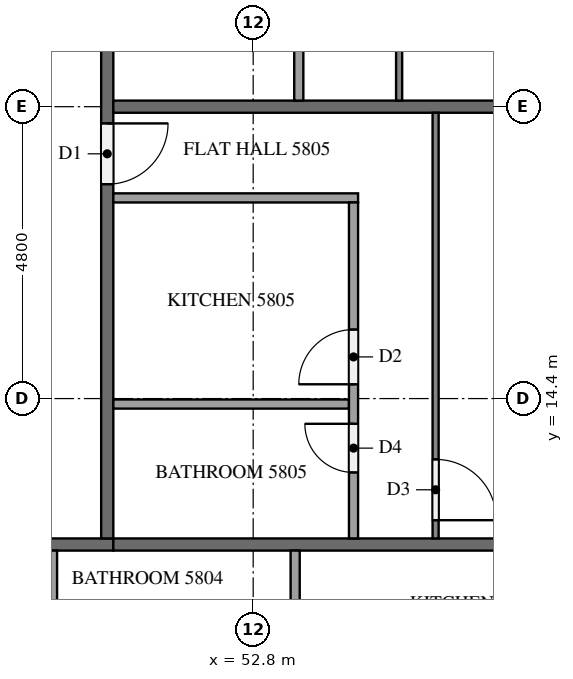
"""IFC4 building model, lengths in metres.
Left out: names, types, materials, properties, quantities, classifications, styles, units other than length and angle.
Written with IfcOpenShell. Run it as: python <this file> out.ifc"""

import sys

from ifc_helpers import new_model, si_unit, direction, frame, frame_2d, origin, place, context, subcontext, project, spatial, rectangle, extrude, element, fill, save


model = new_model("IFC4")
c1 = context("Model", 3, precision=1e-05, world=origin(), true_north=direction((0.0, 1.0)))
c2 = subcontext(c1, "Body", "Model", "MODEL_VIEW")
j1 = project(units=[si_unit("LENGTHUNIT", "METRE"), si_unit("PLANEANGLEUNIT", "RADIAN")], contexts=[c1])
p1 = place(None, origin())
s1 = spatial("IfcSite", under=j1, at=p1, CompositionType="ELEMENT")
p2 = place(p1, origin())
s2 = spatial("IfcBuilding", under=s1, at=p2, CompositionType="ELEMENT")
p3 = place(p2, frame((0.0, 0.0, 222.8)))
s3 = spatial("IfcBuildingStorey", under=s2, at=p3, CompositionType="ELEMENT", Elevation=222.8)
p4 = place(p3, frame((50.5, 12.0, 0.0), z_axis=(0.0, 0.0, 1.0), x_axis=(-1.0, 0.0, 0.0)))
e1 = element("IfcWall", 1, at=p4, inside=s3, PredefinedType="PARTITIONING", context=c2, shape_type="SweptSolid", body=[
    extrude(rectangle(XDim=38.6, YDim=0.2, at=frame_2d((19.3, 0.0))), origin(), (0.0, 0.0, 1.0), 3.2),
])
p5 = place(p4, frame((36.375, 0.0, 0.0)))
e2 = element("IfcOpeningElement", 2, at=p5, cuts=e1, PredefinedType="OPENING", context=c2, shape_type="SweptSolid", body=[
    extrude(rectangle(XDim=1.0, YDim=2.1, at=frame_2d((0.5, 1.05))), frame((0.0, 0.11, 0.0), z_axis=(0.0, -1.0, 0.0), x_axis=(1.0, 0.0, 0.0)), (0.0, 0.0, 1.0), 0.22),
])
p6 = place(p4, frame((34.825, 0.0, 0.0)))
e3 = element("IfcOpeningElement", 3, at=p6, cuts=e1, PredefinedType="OPENING", context=c2, shape_type="SweptSolid", body=[
    extrude(rectangle(XDim=1.0, YDim=2.1, at=frame_2d((0.5, 1.05))), frame((0.0, 0.11, 0.0), z_axis=(0.0, -1.0, 0.0), x_axis=(1.0, 0.0, 0.0)), (0.0, 0.0, 1.0), 0.22),
])
p7 = place(p4, frame((20.375, 0.0, 0.0)))
e4 = element("IfcOpeningElement", 4, at=p7, cuts=e1, PredefinedType="OPENING", context=c2, shape_type="SweptSolid", body=[
    extrude(rectangle(XDim=1.1, YDim=2.1, at=frame_2d((0.55, 1.05))), frame((0.0, 0.11, 0.0), z_axis=(0.0, -1.0, 0.0), x_axis=(1.0, 0.0, 0.0)), (0.0, 0.0, 1.0), 0.22),
])
p8 = place(p4, frame((1.225, 0.0, 0.0)))
e5 = element("IfcOpeningElement", 5, at=p8, cuts=e1, PredefinedType="OPENING", context=c2, shape_type="SweptSolid", body=[
    extrude(rectangle(XDim=1.0, YDim=2.1, at=frame_2d((0.5, 1.05))), frame((0.0, 0.11, 0.0), z_axis=(0.0, -1.0, 0.0), x_axis=(1.0, 0.0, 0.0)), (0.0, 0.0, 1.0), 0.22),
])
p9 = place(p3, frame((50.4, 40.7, 0.0), z_axis=(0.0, 0.0, 1.0), x_axis=(0.0, -1.0, 0.0)))
e6 = element("IfcWall", 6, at=p9, inside=s3, PredefinedType="PARTITIONING", context=c2, shape_type="SweptSolid", body=[
    extrude(rectangle(XDim=28.6, YDim=0.2, at=frame_2d((14.3, 0.0))), origin(), (0.0, 0.0, 1.0), 3.2),
])
p10 = place(p9, frame((21.775, 0.0, 0.0)))
e7 = element("IfcOpeningElement", 7, at=p10, cuts=e6, PredefinedType="OPENING", context=c2, shape_type="SweptSolid", body=[
    extrude(rectangle(XDim=1.0, YDim=2.1, at=frame_2d((0.5, 1.05))), frame((0.0, 0.11, 0.0), z_axis=(0.0, -1.0, 0.0), x_axis=(1.0, 0.0, 0.0)), (0.0, 0.0, 1.0), 0.22),
])
p11 = place(p9, frame((7.375, 0.0, 0.0)))
e8 = element("IfcOpeningElement", 8, at=p11, cuts=e6, PredefinedType="OPENING", context=c2, shape_type="SweptSolid", body=[
    extrude(rectangle(XDim=1.0, YDim=2.1, at=frame_2d((0.5, 1.05))), frame((0.0, 0.11, 0.0), z_axis=(0.0, -1.0, 0.0), x_axis=(1.0, 0.0, 0.0)), (0.0, 0.0, 1.0), 0.22),
])
p12 = place(p9, frame((0.175, 0.0, 0.0)))
e9 = element("IfcOpeningElement", 9, at=p12, cuts=e6, PredefinedType="OPENING", context=c2, shape_type="SweptSolid", body=[
    extrude(rectangle(XDim=1.0, YDim=2.1, at=frame_2d((0.5, 1.05))), frame((0.0, 0.11, 0.0), z_axis=(0.0, -1.0, 0.0), x_axis=(1.0, 0.0, 0.0)), (0.0, 0.0, 1.0), 0.22),
])
p13 = place(p3, frame((50.5, 12.0, 0.0), z_axis=(0.0, 0.0, 1.0), x_axis=(1.0, 0.0, 0.0)))
e10 = element("IfcWall", 10, at=p13, inside=s3, PredefinedType="PARTITIONING", context=c2, shape_type="SweptSolid", body=[
    extrude(rectangle(XDim=11.8, YDim=0.2, at=frame_2d((5.9, 0.0))), origin(), (0.0, 0.0, 1.0), 3.2),
])
p14 = place(p3, frame((50.5, 19.2, 0.0), z_axis=(0.0, 0.0, 1.0), x_axis=(1.0, 0.0, 0.0)))
e11 = element("IfcWall", 11, at=p14, inside=s3, PredefinedType="PARTITIONING", context=c2, shape_type="SweptSolid", body=[
    extrude(rectangle(XDim=11.575, YDim=0.2, at=frame_2d((5.788, 0.0))), origin(), (0.0, 0.0, 1.0), 3.2),
])
p15 = place(p3, frame((53.49, 11.9, 0.0), z_axis=(0.0, 0.0, 1.0), x_axis=(0.0, -1.0, 0.0)))
e12 = element("IfcWall", 12, at=p15, inside=s3, PredefinedType="PARTITIONING", context=c2, shape_type="SweptSolid", body=[
    extrude(rectangle(XDim=1.775, YDim=0.15, at=frame_2d((0.887, 0.0))), origin(), (0.0, 0.0, 1.0), 3.2),
])
p16 = place(p3, frame((49.5, 11.9, 0.0), z_axis=(0.0, 0.0, 1.0), x_axis=(0.0, -1.0, 0.0)))
e13 = element("IfcWall", 13, at=p16, inside=s3, PredefinedType="PARTITIONING", context=c2, shape_type="SweptSolid", body=[
    extrude(rectangle(XDim=1.925, YDim=0.15, at=frame_2d((0.962, 0.0))), origin(), (0.0, 0.0, 1.0), 3.2),
])
p17 = place(p3, frame((55.8, 19.1, 0.0), z_axis=(0.0, 0.0, 1.0), x_axis=(0.0, -1.0, 0.0)))
e14 = element("IfcWall", 14, at=p17, inside=s3, PredefinedType="PARTITIONING", context=c2, shape_type="SweptSolid", body=[
    extrude(rectangle(XDim=7.0, YDim=0.1, at=frame_2d((3.5, 0.0))), origin(), (0.0, 0.0, 1.0), 3.2),
])
p18 = place(p17, frame((5.7, 0.0, 0.0)))
e15 = element("IfcOpeningElement", 15, at=p18, cuts=e14, PredefinedType="OPENING", context=c2, shape_type="SweptSolid", body=[
    extrude(rectangle(XDim=1.0, YDim=2.1, at=frame_2d((0.5, 1.05))), frame((0.0, 0.06, 0.0), z_axis=(0.0, -1.0, 0.0), x_axis=(1.0, 0.0, 0.0)), (0.0, 0.0, 1.0), 0.12),
])
p19 = place(p3, frame((50.5, 14.31, 0.0), z_axis=(0.0, 0.0, 1.0), x_axis=(1.0, 0.0, 0.0)))
e16 = element("IfcWall", 16, at=p19, inside=s3, PredefinedType="PARTITIONING", context=c2, shape_type="SweptSolid", body=[
    extrude(rectangle(XDim=3.875, YDim=0.15, at=frame_2d((1.938, 0.0))), origin(), (0.0, 0.0, 1.0), 3.2),
])
p20 = place(p3, frame((50.5, 17.7, 0.0), z_axis=(0.0, 0.0, 1.0), x_axis=(1.0, 0.0, 0.0)))
e17 = element("IfcWall", 17, at=p20, inside=s3, PredefinedType="PARTITIONING", context=c2, shape_type="SweptSolid", body=[
    extrude(rectangle(XDim=4.025, YDim=0.15, at=frame_2d((2.012, 0.0))), origin(), (0.0, 0.0, 1.0), 3.2),
])
p21 = place(p3, frame((54.45, 12.1, 0.0), z_axis=(0.0, 0.0, 1.0), x_axis=(0.0, 1.0, 0.0)))
e18 = element("IfcWall", 18, at=p21, inside=s3, PredefinedType="PARTITIONING", context=c2, shape_type="SweptSolid", body=[
    extrude(rectangle(XDim=5.525, YDim=0.15, at=frame_2d((2.762, 0.0))), origin(), (0.0, 0.0, 1.0), 3.2),
])
p22 = place(p21, frame((2.535, 0.0, 0.0)))
e19 = element("IfcOpeningElement", 19, at=p22, cuts=e18, PredefinedType="OPENING", context=c2, shape_type="SweptSolid", body=[
    extrude(rectangle(XDim=0.9, YDim=2.1, at=frame_2d((0.45, 1.05))), frame((0.0, 0.085, 0.0), z_axis=(0.0, -1.0, 0.0), x_axis=(1.0, 0.0, 0.0)), (0.0, 0.0, 1.0), 0.17),
])
p23 = place(p21, frame((1.085, 0.0, 0.0)))
e20 = element("IfcOpeningElement", 20, at=p23, cuts=e18, PredefinedType="OPENING", context=c2, shape_type="SweptSolid", body=[
    extrude(rectangle(XDim=0.8, YDim=2.1, at=frame_2d((0.4, 1.05))), frame((0.0, 0.085, 0.0), z_axis=(0.0, -1.0, 0.0), x_axis=(1.0, 0.0, 0.0)), (0.0, 0.0, 1.0), 0.17),
])
p24 = place(p3, frame((55.2, 33.5, 0.0), z_axis=(0.0, 0.0, 1.0), x_axis=(0.0, -1.0, 0.0)))
e21 = element("IfcWall", 21, at=p24, inside=s3, PredefinedType="PARTITIONING", context=c2, shape_type="SweptSolid", body=[
    extrude(rectangle(XDim=14.2, YDim=0.1, at=frame_2d((7.1, 0.0))), origin(), (0.0, 0.0, 1.0), 3.2),
])
p25 = place(p24, frame((0.3, 0.0, 0.0)))
e22 = element("IfcOpeningElement", 22, at=p25, cuts=e21, PredefinedType="OPENING", context=c2, shape_type="SweptSolid", body=[
    extrude(rectangle(XDim=0.9, YDim=2.1, at=frame_2d((0.45, 1.05))), frame((0.0, 0.06, 0.0), z_axis=(0.0, -1.0, 0.0), x_axis=(1.0, 0.0, 0.0)), (0.0, 0.0, 1.0), 0.12),
])
p26 = place(p24, frame((8.25, 0.0, 0.0)))
e23 = element("IfcOpeningElement", 23, at=p26, cuts=e21, PredefinedType="OPENING", context=c2, shape_type="SweptSolid", body=[
    extrude(rectangle(XDim=0.9, YDim=2.1, at=frame_2d((0.45, 1.05))), frame((0.0, 0.06, 0.0), z_axis=(0.0, -1.0, 0.0), x_axis=(1.0, 0.0, 0.0)), (0.0, 0.0, 1.0), 0.12),
])
p27 = place(p24, frame((9.85, 0.0, 0.0)))
e24 = element("IfcOpeningElement", 24, at=p27, cuts=e21, PredefinedType="OPENING", context=c2, shape_type="SweptSolid", body=[
    extrude(rectangle(XDim=1.0, YDim=2.1, at=frame_2d((0.5, 1.05))), frame((0.0, 0.06, 0.0), z_axis=(0.0, -1.0, 0.0), x_axis=(1.0, 0.0, 0.0)), (0.0, 0.0, 1.0), 0.12),
])
p28 = place(p3, frame((53.55, 19.3, 0.0), z_axis=(0.0, 0.0, 1.0), x_axis=(0.0, 1.0, 0.0)))
e25 = element("IfcWall", 25, at=p28, inside=s3, PredefinedType="PARTITIONING", context=c2, shape_type="SweptSolid", body=[
    extrude(rectangle(XDim=12.725, YDim=0.15, at=frame_2d((6.362, 0.0))), origin(), (0.0, 0.0, 1.0), 3.2),
])
p29 = place(p28, frame((11.525, 0.0, 0.0)))
e26 = element("IfcOpeningElement", 26, at=p29, cuts=e25, PredefinedType="OPENING", context=c2, shape_type="SweptSolid", body=[
    extrude(rectangle(XDim=0.9, YDim=2.1, at=frame_2d((0.45, 1.05))), frame((0.0, 0.085, 0.0), z_axis=(0.0, -1.0, 0.0), x_axis=(1.0, 0.0, 0.0)), (0.0, 0.0, 1.0), 0.17),
])
p30 = place(p28, frame((3.261, 0.0, 0.0)))
e27 = element("IfcOpeningElement", 27, at=p30, cuts=e25, PredefinedType="OPENING", context=c2, shape_type="SweptSolid", body=[
    extrude(rectangle(XDim=0.9, YDim=2.1, at=frame_2d((0.45, 1.05))), frame((0.0, 0.085, 0.0), z_axis=(0.0, -1.0, 0.0), x_axis=(1.0, 0.0, 0.0)), (0.0, 0.0, 1.0), 0.17),
])
p31 = place(p28, frame((1.812, 0.0, 0.0)))
e28 = element("IfcOpeningElement", 28, at=p31, cuts=e25, PredefinedType="OPENING", context=c2, shape_type="SweptSolid", body=[
    extrude(rectangle(XDim=0.8, YDim=2.1, at=frame_2d((0.4, 1.05))), frame((0.0, 0.085, 0.0), z_axis=(0.0, -1.0, 0.0), x_axis=(1.0, 0.0, 0.0)), (0.0, 0.0, 1.0), 0.17),
])
p32 = place(p10, origin())
e29 = element("IfcDoor", 29, at=p32, inside=s3, OperationType="SINGLE_SWING_LEFT", PredefinedType="DOOR", context=c2, shape_type="SweptSolid", body=[
    extrude(rectangle(XDim=1.0, YDim=2.1, at=frame_2d((0.5, 1.05))), frame((0.0, 0.025, 0.0), z_axis=(0.0, -1.0, 0.0), x_axis=(1.0, 0.0, 0.0)), (0.0, 0.0, 1.0), 0.05),
])
fill(e7, e29)
p33 = place(p18, origin())
e30 = element("IfcDoor", 30, at=p33, inside=s3, OperationType="SINGLE_SWING_RIGHT", PredefinedType="DOOR", context=c2, shape_type="SweptSolid", body=[
    extrude(rectangle(XDim=1.0, YDim=2.1, at=frame_2d((0.5, 1.05))), frame((0.0, 0.025, 0.0), z_axis=(0.0, -1.0, 0.0), x_axis=(1.0, 0.0, 0.0)), (0.0, 0.0, 1.0), 0.05),
])
fill(e15, e30)
p34 = place(p22, origin())
e31 = element("IfcDoor", 31, at=p34, inside=s3, OperationType="SINGLE_SWING_LEFT", PredefinedType="DOOR", context=c2, shape_type="SweptSolid", body=[
    extrude(rectangle(XDim=0.9, YDim=2.1, at=frame_2d((0.45, 1.05))), frame((0.0, 0.025, 0.0), z_axis=(0.0, -1.0, 0.0), x_axis=(1.0, 0.0, 0.0)), (0.0, 0.0, 1.0), 0.05),
])
fill(e19, e31)
p35 = place(p23, origin())
e32 = element("IfcDoor", 32, at=p35, inside=s3, OperationType="SINGLE_SWING_RIGHT", PredefinedType="DOOR", context=c2, shape_type="SweptSolid", body=[
    extrude(rectangle(XDim=0.8, YDim=2.1, at=frame_2d((0.4, 1.05))), frame((0.0, 0.025, 0.0), z_axis=(0.0, -1.0, 0.0), x_axis=(1.0, 0.0, 0.0)), (0.0, 0.0, 1.0), 0.05),
])
fill(e20, e32)
save(model, sys.argv[1])
